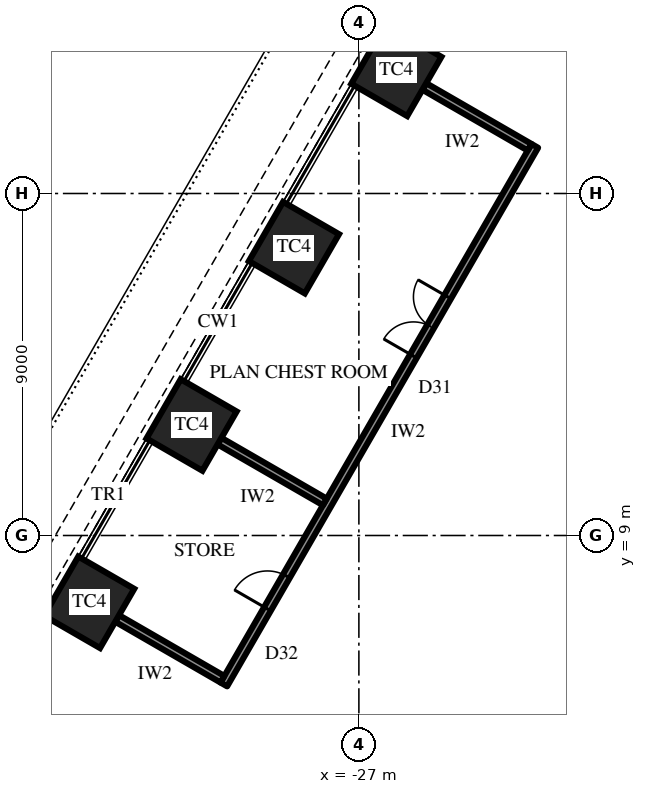
"""IFC4 building model, lengths in metres.
Left out: names, types, materials, properties, quantities, classifications, styles, units other than length and angle.
Written with IfcOpenShell. Run it as: python <this file> out.ifc"""

import sys

from ifc_helpers import new_model, si_unit, direction, frame, frame_2d, origin, origin_2d, place, context, subcontext, project, spatial, rectangle, extrude, element, fill, save


model = new_model("IFC4")
c1 = context("Model", 3, precision=1e-05, world=origin(), true_north=direction((0.0, 1.0)))
c2 = subcontext(c1, "Body", "Model", "MODEL_VIEW")
j1 = project(units=[si_unit("LENGTHUNIT", "METRE"), si_unit("PLANEANGLEUNIT", "RADIAN")], contexts=[c1])
p1 = place(None, origin())
s1 = spatial("IfcSite", under=j1, at=p1, CompositionType="ELEMENT")
p2 = place(p1, origin())
s2 = spatial("IfcBuilding", under=s1, at=p2, CompositionType="ELEMENT")
p3 = place(p2, frame((0.0, 0.0, 90.7)))
s3 = spatial("IfcBuildingStorey", under=s2, at=p3, CompositionType="ELEMENT", Elevation=90.7)
for number, where, z_axis, x_axis in (
    (1, (-26.014, 21.242, 0.0), (0.0, 0.0, 1.0), (-0.5, -0.866, 0.0)),
    (2, (-28.709, 16.575, 0.0), (0.0, 0.0, 1.0), (-0.5, -0.866, 0.0)),
    (3, (-31.403, 11.908, 0.0), (0.0, 0.0, 1.0), (-0.5, -0.866, 0.0)),
    (4, (-34.097, 7.242, 0.0), (0.0, 0.0, 1.0), (-0.5, -0.866, 0.0)),
):
    element("IfcColumn", number, at=place(p3, frame(where, z_axis=z_axis, x_axis=x_axis)), inside=s3, PredefinedType="COLUMN", context=c2, shape_type="SweptSolid", body=[
        extrude(rectangle(XDim=1.8, YDim=1.7, at=origin_2d()), origin(), (0.0, 0.0, 1.0), 4.2),
    ])
p4 = place(p3, frame((-22.37, 19.253, 0.0), z_axis=(0.0, 0.0, 1.0), x_axis=(-0.500000949028, -0.866024855862, 0.0)))
e5 = element("IfcWall", 5, at=p4, inside=s3, PredefinedType="PARTITIONING", context=c2, shape_type="SweptSolid", body=[
    extrude(rectangle(XDim=16.366, YDim=0.2, at=frame_2d((8.183, 0.0))), origin(), (0.0, 0.0, 1.0), 4.0),
])
p5 = place(p4, frame((4.589, 0.0, 0.0)))
e6 = element("IfcOpeningElement", 6, at=p5, cuts=e5, PredefinedType="OPENING", context=c2, shape_type="SweptSolid", body=[
    extrude(rectangle(XDim=1.8, YDim=2.4, at=frame_2d((0.9, 1.2))), frame((0.0, 0.11, 0.0), z_axis=(0.0, -1.0, 0.0), x_axis=(1.0, 0.0, 0.0)), (0.0, 0.0, 1.0), 0.22),
])
p6 = place(p4, frame((13.072, 0.0, 0.0)))
e7 = element("IfcOpeningElement", 7, at=p6, cuts=e5, PredefinedType="OPENING", context=c2, shape_type="SweptSolid", body=[
    extrude(rectangle(XDim=1.0, YDim=2.2, at=frame_2d((0.5, 1.1))), frame((0.0, 0.11, 0.0), z_axis=(0.0, -1.0, 0.0), x_axis=(1.0, 0.0, 0.0)), (0.0, 0.0, 1.0), 0.22),
])
p7 = place(p3, frame((-22.507, 19.217, 0.0), z_axis=(0.0, 0.0, 1.0), x_axis=(-0.866008981251, 0.500028443584, 0.0)))
e8 = element("IfcWall", 8, at=p7, inside=s3, PredefinedType="PARTITIONING", context=c2, shape_type="SweptSolid", body=[
    extrude(rectangle(XDim=3.2, YDim=0.2, at=frame_2d((1.6, 0.0))), origin(), (0.0, 0.0, 1.0), 2.992),
])
p8 = place(p3, frame((-27.896, 9.883, 0.0), z_axis=(0.0, 0.0, 1.0), x_axis=(-0.866008981251, 0.500028443584, 0.0)))
e9 = element("IfcWall", 9, at=p8, inside=s3, PredefinedType="PARTITIONING", context=c2, shape_type="SweptSolid", body=[
    extrude(rectangle(XDim=3.2, YDim=0.2, at=frame_2d((1.6, 0.0))), origin(), (0.0, 0.0, 1.0), 2.944),
])
p9 = place(p3, frame((-30.59, 5.217, 0.0), z_axis=(0.0, 0.0, 1.0), x_axis=(-0.866028054938, 0.499995408039, 0.0)))
e10 = element("IfcWall", 10, at=p9, inside=s3, PredefinedType="PARTITIONING", context=c2, shape_type="SweptSolid", body=[
    extrude(rectangle(XDim=3.2, YDim=0.2, at=frame_2d((1.6, 0.0))), origin(), (0.0, 0.0, 1.0), 2.944),
])
p10 = place(p5, frame((1.8, 0.0, 0.0), z_axis=(0.0, 0.0, 1.0), x_axis=(-1.0, 0.0, 0.0)))
e11 = element("IfcDoor", 11, at=p10, inside=s3, OperationType="DOUBLE_DOOR_SINGLE_SWING", PredefinedType="DOOR", context=c2, shape_type="SweptSolid", body=[
    extrude(rectangle(XDim=1.8, YDim=2.4, at=frame_2d((0.9, 1.2))), frame((0.0, 0.025, 0.0), z_axis=(0.0, -1.0, 0.0), x_axis=(1.0, 0.0, 0.0)), (0.0, 0.0, 1.0), 0.05),
])
fill(e6, e11)
p11 = place(p6, frame((1.0, 0.0, 0.0), z_axis=(0.0, 0.0, 1.0), x_axis=(-1.0, 0.0, 0.0)))
e12 = element("IfcDoor", 12, at=p11, inside=s3, OperationType="SINGLE_SWING_RIGHT", PredefinedType="DOOR", context=c2, shape_type="SweptSolid", body=[
    extrude(rectangle(XDim=1.0, YDim=2.2, at=frame_2d((0.5, 1.1))), frame((0.0, 0.025, 0.0), z_axis=(0.0, -1.0, 0.0), x_axis=(1.0, 0.0, 0.0)), (0.0, 0.0, 1.0), 0.05),
])
fill(e7, e12)
save(model, sys.argv[1])
